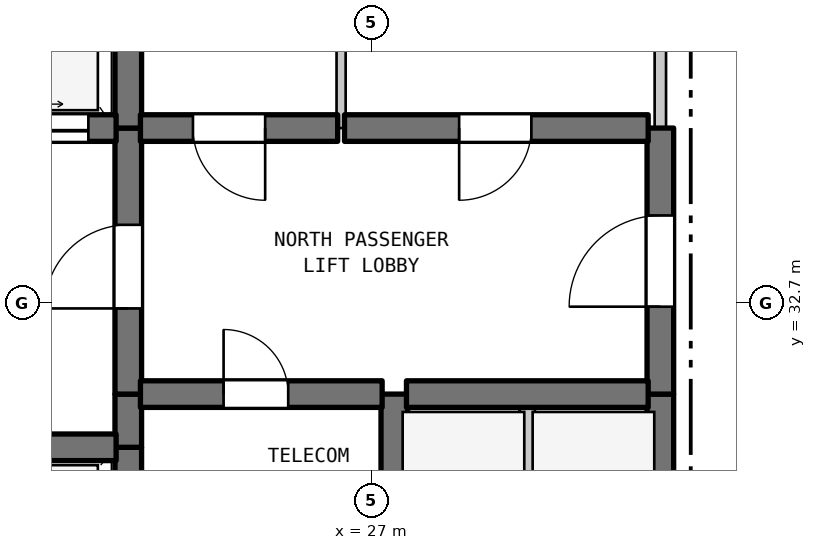
"""IFC4 building model, lengths in metres.
Left out: names, types, materials, properties, quantities, classifications, styles, units other than length and angle.
Written with IfcOpenShell. Run it as: python <this file> out.ifc"""

import sys

from ifc_helpers import new_model, si_unit, direction, frame, frame_2d, origin, place, context, subcontext, project, spatial, rectangle, extrude, element, fill, save


model = new_model("IFC4")
c1 = context("Model", 3, precision=1e-05, world=origin(), true_north=direction((0.0, 1.0)))
c2 = subcontext(c1, "Body", "Model", "MODEL_VIEW")
j1 = project(units=[si_unit("LENGTHUNIT", "METRE"), si_unit("PLANEANGLEUNIT", "RADIAN")], contexts=[c1])
p1 = place(None, origin())
s1 = spatial("IfcSite", under=j1, at=p1, CompositionType="ELEMENT")
p2 = place(p1, origin())
s2 = spatial("IfcBuilding", under=s1, at=p2, CompositionType="ELEMENT")
p3 = place(p2, frame((0.0, 0.0, 144.6)))
s3 = spatial("IfcBuildingStorey", under=s2, at=p3, CompositionType="ELEMENT", Elevation=144.6)
p4 = place(p3, frame((23.8, 29.5, 0.0), z_axis=(0.0, 0.0, 1.0), x_axis=(0.0, 1.0, 0.0)))
e1 = element("IfcWall", 1, at=p4, inside=s3, PredefinedType="SHEAR", context=c2, shape_type="SweptSolid", body=[
    extrude(rectangle(XDim=1.3, YDim=0.35, at=frame_2d((0.65, 0.0))), origin(), (0.0, 0.0, 1.0), 3.385),
])
p5 = place(p3, frame((23.8, 30.8, 0.0), z_axis=(0.0, 0.0, 1.0), x_axis=(0.0, 1.0, 0.0)))
e2 = element("IfcWall", 2, at=p5, inside=s3, PredefinedType="SHEAR", context=c2, shape_type="SweptSolid", body=[
    extrude(rectangle(XDim=0.7, YDim=0.35, at=frame_2d((0.35, 0.0))), origin(), (0.0, 0.0, 1.0), 3.385),
])
p6 = place(p3, frame((23.8, 31.5, 0.0), z_axis=(0.0, 0.0, 1.0), x_axis=(0.0, 1.0, 0.0)))
e3 = element("IfcWall", 3, at=p6, inside=s3, PredefinedType="SHEAR", context=c2, shape_type="SweptSolid", body=[
    extrude(rectangle(XDim=3.5, YDim=0.35, at=frame_2d((1.75, 0.0))), origin(), (0.0, 0.0, 1.0), 3.385),
])
p7 = place(p6, frame((1.127, 0.0, 0.0)))
e4 = element("IfcOpeningElement", 4, at=p7, cuts=e3, PredefinedType="OPENING", context=c2, shape_type="SweptSolid", body=[
    extrude(rectangle(XDim=1.1, YDim=2.15, at=frame_2d((0.55, 1.075))), frame((0.0, 0.185, 0.0), z_axis=(0.0, -1.0, 0.0), x_axis=(1.0, 0.0, 0.0)), (0.0, 0.0, 1.0), 0.37),
])
p8 = place(p3, frame((23.8, 35.0, 0.0), z_axis=(0.0, 0.0, 1.0), x_axis=(0.0, 1.0, 0.0)))
e5 = element("IfcWall", 5, at=p8, inside=s3, PredefinedType="SHEAR", context=c2, shape_type="SweptSolid", body=[
    extrude(rectangle(XDim=2.9, YDim=0.35, at=frame_2d((1.45, 0.0))), origin(), (0.0, 0.0, 1.0), 3.385),
])
p9 = place(p3, frame((26.6, 35.0, 0.0), z_axis=(0.0, 0.0, 1.0), x_axis=(0.0, 1.0, 0.0)))
e6 = element("IfcWall", 6, at=p9, inside=s3, PredefinedType="PARTITIONING", context=c2, shape_type="SweptSolid", body=[
    extrude(rectangle(XDim=2.9, YDim=0.12, at=frame_2d((1.45, 0.0))), origin(), (0.0, 0.0, 1.0), 3.385),
])
p10 = place(p3, frame((27.3, 29.5, 0.0), z_axis=(0.0, 0.0, 1.0), x_axis=(0.0, 1.0, 0.0)))
e7 = element("IfcWall", 7, at=p10, inside=s3, PredefinedType="SHEAR", context=c2, shape_type="SweptSolid", body=[
    extrude(rectangle(XDim=2.0, YDim=0.35, at=frame_2d((1.0, 0.0))), origin(), (0.0, 0.0, 1.0), 3.385),
])
p11 = place(p3, frame((29.05, 28.9, 0.0), z_axis=(0.0, 0.0, 1.0), x_axis=(0.0, 1.0, 0.0)))
e8 = element("IfcWall", 8, at=p11, inside=s3, PredefinedType="STANDARD", context=c2, shape_type="SweptSolid", body=[
    extrude(rectangle(XDim=2.6, YDim=0.2, at=frame_2d((1.3, 0.0))), origin(), (0.0, 0.0, 1.0), 3.385),
])
p12 = place(p3, frame((30.8, 28.9, 0.0), z_axis=(0.0, 0.0, 1.0), x_axis=(0.0, 1.0, 0.0)))
e9 = element("IfcWall", 9, at=p12, inside=s3, PredefinedType="SHEAR", context=c2, shape_type="SweptSolid", body=[
    extrude(rectangle(XDim=2.6, YDim=0.35, at=frame_2d((1.3, 0.0))), origin(), (0.0, 0.0, 1.0), 3.385),
])
p13 = place(p3, frame((30.8, 31.5, 0.0), z_axis=(0.0, 0.0, 1.0), x_axis=(0.0, 1.0, 0.0)))
e10 = element("IfcWall", 10, at=p13, inside=s3, PredefinedType="SHEAR", context=c2, shape_type="SweptSolid", body=[
    extrude(rectangle(XDim=3.5, YDim=0.35, at=frame_2d((1.75, 0.0))), origin(), (0.0, 0.0, 1.0), 3.385),
])
p14 = place(p13, frame((1.15, 0.0, 0.0)))
e11 = element("IfcOpeningElement", 11, at=p14, cuts=e10, PredefinedType="OPENING", context=c2, shape_type="SweptSolid", body=[
    extrude(rectangle(XDim=1.2, YDim=2.2, at=frame_2d((0.6, 1.1))), frame((0.0, 0.185, 0.0), z_axis=(0.0, -1.0, 0.0), x_axis=(1.0, 0.0, 0.0)), (0.0, 0.0, 1.0), 0.37),
])
p15 = place(p3, frame((30.8, 35.0, 0.0), z_axis=(0.0, 0.0, 1.0), x_axis=(0.0, 1.0, 0.0)))
e12 = element("IfcWall", 12, at=p15, inside=s3, PredefinedType="STANDARD", context=c2, shape_type="SweptSolid", body=[
    extrude(rectangle(XDim=2.9, YDim=0.15, at=frame_2d((1.45, 0.0))), origin(), (0.0, 0.0, 1.0), 3.385),
])
p16 = place(p3, frame((19.16, 30.8, 0.0), z_axis=(0.0, 0.0, 1.0), x_axis=(1.0, 0.0, 0.0)))
e13 = element("IfcWall", 13, at=p16, inside=s3, PredefinedType="SHEAR", context=c2, shape_type="SweptSolid", body=[
    extrude(rectangle(XDim=4.48, YDim=0.35, at=frame_2d((2.24, 0.0))), origin(), (0.0, 0.0, 1.0), 3.385),
])
p17 = place(p3, frame((23.96, 31.5, 0.0), z_axis=(0.0, 0.0, 1.0), x_axis=(1.0, 0.0, 0.0)))
e14 = element("IfcWall", 14, at=p17, inside=s3, PredefinedType="SHEAR", context=c2, shape_type="SweptSolid", body=[
    extrude(rectangle(XDim=3.18, YDim=0.35, at=frame_2d((1.59, 0.0))), origin(), (0.0, 0.0, 1.0), 3.385),
])
p18 = place(p17, frame((1.094, 0.0, 0.0)))
e15 = element("IfcOpeningElement", 15, at=p18, cuts=e14, PredefinedType="OPENING", context=c2, shape_type="SweptSolid", body=[
    extrude(rectangle(XDim=0.85, YDim=2.1, at=frame_2d((0.425, 1.05))), frame((0.0, 0.185, 0.0), z_axis=(0.0, -1.0, 0.0), x_axis=(1.0, 0.0, 0.0)), (0.0, 0.0, 1.0), 0.37),
])
p19 = place(p3, frame((27.46, 31.5, 0.0), z_axis=(0.0, 0.0, 1.0), x_axis=(1.0, 0.0, 0.0)))
e16 = element("IfcWall", 16, at=p19, inside=s3, PredefinedType="SHEAR", context=c2, shape_type="SweptSolid", body=[
    extrude(rectangle(XDim=3.18, YDim=0.35, at=frame_2d((1.59, 0.0))), origin(), (0.0, 0.0, 1.0), 3.385),
])
p20 = place(p3, frame((19.16, 35.0, 0.0), z_axis=(0.0, 0.0, 1.0), x_axis=(1.0, 0.0, 0.0)))
e17 = element("IfcWall", 17, at=p20, inside=s3, PredefinedType="SHEAR", context=c2, shape_type="SweptSolid", body=[
    extrude(rectangle(XDim=4.48, YDim=0.35, at=frame_2d((2.24, 0.0))), origin(), (0.0, 0.0, 1.0), 3.385),
])
p21 = place(p20, frame((0.365, 0.0, 0.0)))
e18 = element("IfcOpeningElement", 18, at=p21, cuts=e17, PredefinedType="OPENING", context=c2, shape_type="SweptSolid", body=[
    extrude(rectangle(XDim=1.35, YDim=2.2, at=frame_2d((0.675, 1.1))), frame((0.0, 0.185, 0.0), z_axis=(0.0, -1.0, 0.0), x_axis=(1.0, 0.0, 0.0)), (0.0, 0.0, 1.0), 0.37),
])
p22 = place(p20, frame((2.765, 0.0, 0.0)))
e19 = element("IfcOpeningElement", 19, at=p22, cuts=e17, PredefinedType="OPENING", context=c2, shape_type="SweptSolid", body=[
    extrude(rectangle(XDim=1.35, YDim=2.2, at=frame_2d((0.675, 1.1))), frame((0.0, 0.185, 0.0), z_axis=(0.0, -1.0, 0.0), x_axis=(1.0, 0.0, 0.0)), (0.0, 0.0, 1.0), 0.37),
])
p23 = place(p3, frame((23.96, 35.0, 0.0), z_axis=(0.0, 0.0, 1.0), x_axis=(1.0, 0.0, 0.0)))
e20 = element("IfcWall", 20, at=p23, inside=s3, PredefinedType="SHEAR", context=c2, shape_type="SweptSolid", body=[
    extrude(rectangle(XDim=2.595, YDim=0.35, at=frame_2d((1.297, 0.0))), origin(), (0.0, 0.0, 1.0), 3.385),
])
p24 = place(p23, frame((0.691, 0.0, 0.0)))
e21 = element("IfcOpeningElement", 21, at=p24, cuts=e20, PredefinedType="OPENING", context=c2, shape_type="SweptSolid", body=[
    extrude(rectangle(XDim=0.95, YDim=2.15, at=frame_2d((0.475, 1.075))), frame((0.0, 0.185, 0.0), z_axis=(0.0, -1.0, 0.0), x_axis=(1.0, 0.0, 0.0)), (0.0, 0.0, 1.0), 0.37),
])
p25 = place(p3, frame((26.645, 35.0, 0.0), z_axis=(0.0, 0.0, 1.0), x_axis=(1.0, 0.0, 0.0)))
e22 = element("IfcWall", 22, at=p25, inside=s3, PredefinedType="SHEAR", context=c2, shape_type="SweptSolid", body=[
    extrude(rectangle(XDim=3.995, YDim=0.35, at=frame_2d((1.998, 0.0))), origin(), (0.0, 0.0, 1.0), 3.385),
])
p26 = place(p25, frame((1.508, 0.0, 0.0)))
e23 = element("IfcOpeningElement", 23, at=p26, cuts=e22, PredefinedType="OPENING", context=c2, shape_type="SweptSolid", body=[
    extrude(rectangle(XDim=0.95, YDim=2.15, at=frame_2d((0.475, 1.075))), frame((0.0, 0.185, 0.0), z_axis=(0.0, -1.0, 0.0), x_axis=(1.0, 0.0, 0.0)), (0.0, 0.0, 1.0), 0.37),
])
p27 = place(p7, origin())
e24 = element("IfcDoor", 24, at=p27, inside=s3, OperationType="SINGLE_SWING_LEFT", PredefinedType="DOOR", context=c2, shape_type="SweptSolid", body=[
    extrude(rectangle(XDim=1.1, YDim=2.15, at=frame_2d((0.55, 1.075))), frame((0.0, 0.025, 0.0), z_axis=(0.0, -1.0, 0.0), x_axis=(1.0, 0.0, 0.0)), (0.0, 0.0, 1.0), 0.05),
])
fill(e4, e24)
p28 = place(p14, origin())
e25 = element("IfcDoor", 25, at=p28, inside=s3, OperationType="SINGLE_SWING_LEFT", PredefinedType="DOOR", context=c2, shape_type="SweptSolid", body=[
    extrude(rectangle(XDim=1.2, YDim=2.2, at=frame_2d((0.6, 1.1))), frame((0.0, 0.025, 0.0), z_axis=(0.0, -1.0, 0.0), x_axis=(1.0, 0.0, 0.0)), (0.0, 0.0, 1.0), 0.05),
])
fill(e11, e25)
p29 = place(p18, origin())
e26 = element("IfcDoor", 26, at=p29, inside=s3, OperationType="SINGLE_SWING_LEFT", PredefinedType="DOOR", context=c2, shape_type="SweptSolid", body=[
    extrude(rectangle(XDim=0.85, YDim=2.1, at=frame_2d((0.425, 1.05))), frame((0.0, 0.025, 0.0), z_axis=(0.0, -1.0, 0.0), x_axis=(1.0, 0.0, 0.0)), (0.0, 0.0, 1.0), 0.05),
])
fill(e15, e26)
p30 = place(p22, origin())
e27 = element("IfcDoor", 27, at=p30, inside=s3, OperationType="DOUBLE_DOOR_SLIDING", PredefinedType="DOOR", context=c2, shape_type="SweptSolid", body=[
    extrude(rectangle(XDim=1.35, YDim=2.2, at=frame_2d((0.675, 1.1))), frame((0.0, 0.025, 0.0), z_axis=(0.0, -1.0, 0.0), x_axis=(1.0, 0.0, 0.0)), (0.0, 0.0, 1.0), 0.05),
])
fill(e19, e27)
p31 = place(p24, frame((0.95, 0.0, 0.0), z_axis=(0.0, 0.0, 1.0), x_axis=(-1.0, 0.0, 0.0)))
e28 = element("IfcDoor", 28, at=p31, inside=s3, OperationType="SINGLE_SWING_RIGHT", PredefinedType="DOOR", context=c2, shape_type="SweptSolid", body=[
    extrude(rectangle(XDim=0.95, YDim=2.15, at=frame_2d((0.475, 1.075))), frame((0.0, 0.025, 0.0), z_axis=(0.0, -1.0, 0.0), x_axis=(1.0, 0.0, 0.0)), (0.0, 0.0, 1.0), 0.05),
])
fill(e21, e28)
p32 = place(p26, frame((0.95, 0.0, 0.0), z_axis=(0.0, 0.0, 1.0), x_axis=(-1.0, 0.0, 0.0)))
e29 = element("IfcDoor", 29, at=p32, inside=s3, OperationType="SINGLE_SWING_LEFT", PredefinedType="DOOR", context=c2, shape_type="SweptSolid", body=[
    extrude(rectangle(XDim=0.95, YDim=2.15, at=frame_2d((0.475, 1.075))), frame((0.0, 0.025, 0.0), z_axis=(0.0, -1.0, 0.0), x_axis=(1.0, 0.0, 0.0)), (0.0, 0.0, 1.0), 0.05),
])
fill(e23, e29)
save(model, sys.argv[1])
